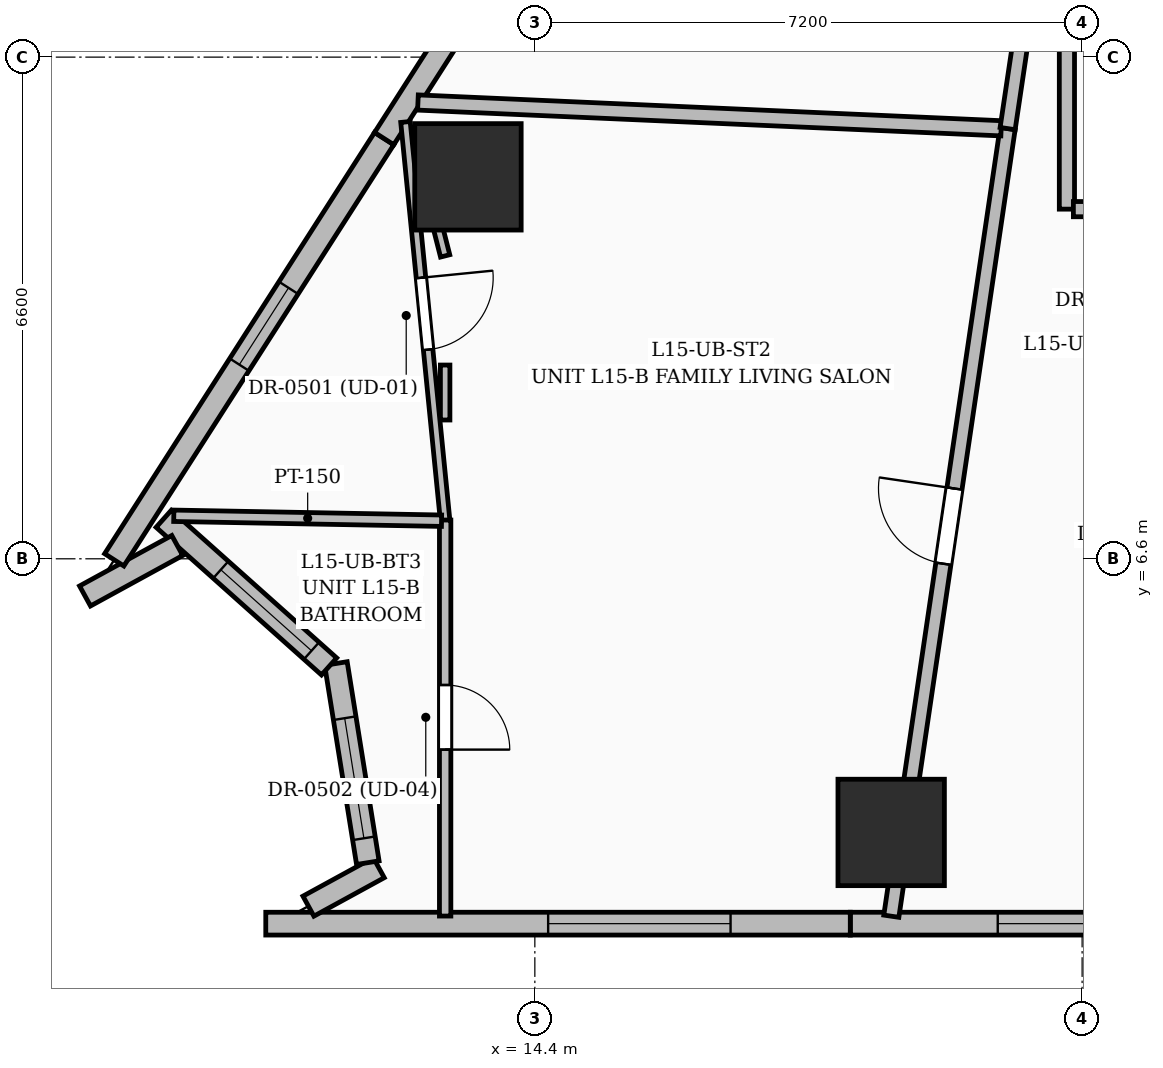
"""IFC4 building model, lengths in metres.
Left out: names, types, materials, properties, quantities, classifications, styles, units other than length and angle.
Written with IfcOpenShell. Run it as: python <this file> out.ifc"""

import sys

from ifc_helpers import new_model, si_unit, direction, frame, frame_2d, origin, origin_2d, place, context, subcontext, project, spatial, rectangle, extrude, element, fill, save


model = new_model("IFC4")
c1 = context("Model", 3, precision=1e-05, world=origin(), true_north=direction((0.0, 1.0)))
c2 = subcontext(c1, "Body", "Model", "MODEL_VIEW")
j1 = project(units=[si_unit("LENGTHUNIT", "METRE"), si_unit("PLANEANGLEUNIT", "RADIAN")], contexts=[c1])
p1 = place(None, origin())
s1 = spatial("IfcSite", under=j1, at=p1, CompositionType="ELEMENT")
p2 = place(p1, origin())
s2 = spatial("IfcBuilding", under=s1, at=p2, CompositionType="ELEMENT")
p3 = place(p2, frame((0.0, 0.0, 64.2)))
s3 = spatial("IfcBuildingStorey", under=s2, at=p3, CompositionType="ELEMENT", Elevation=64.2)
for number, where, z_axis, x_axis in (
    (1, (19.088, 3.0, 0.0), (0.0, 0.0, 1.0), (1.0, 0.0, 0.0)),
    (2, (13.52, 11.625, 0.0), (0.0, 0.0, 1.0), (1.0, 0.0, 0.0)),
):
    element("IfcColumn", number, at=place(p3, frame(where, z_axis=z_axis, x_axis=x_axis)), inside=s3, PredefinedType="COLUMN", context=c2, shape_type="SweptSolid", body=[
        extrude(rectangle(XDim=1.4, YDim=1.4, at=origin_2d()), origin(), (0.0, 0.0, 1.0), 3.6),
    ])
p4 = place(p3, frame((25.96, 1.8, 0.0), z_axis=(0.0, 0.0, 1.0), x_axis=(-1.0, 0.0, 0.0)))
e3 = element("IfcWall", 3, at=p4, inside=s3, PredefinedType="SOLIDWALL", context=c2, shape_type="SweptSolid", body=[
    extrude(rectangle(XDim=7.41, YDim=0.3, at=frame_2d((3.705, 0.0))), origin(), (0.0, 0.0, 1.0), 3.35),
])
p5 = place(p4, frame((4.27, 0.0, 0.8)))
e4 = element("IfcOpeningElement", 4, at=p5, cuts=e3, PredefinedType="OPENING", context=c2, shape_type="SweptSolid", body=[
    extrude(rectangle(XDim=1.2, YDim=1.8, at=frame_2d((0.6, 0.9))), frame((0.0, 0.16, 0.0), z_axis=(0.0, -1.0, 0.0), x_axis=(1.0, 0.0, 0.0)), (0.0, 0.0, 1.0), 0.32),
])
p6 = place(p3, frame((18.55, 1.8, 0.0), z_axis=(0.0, 0.0, 1.0), x_axis=(-1.0, 0.0, 0.0)))
e5 = element("IfcWall", 5, at=p6, inside=s3, PredefinedType="SOLIDWALL", context=c2, shape_type="SweptSolid", body=[
    extrude(rectangle(XDim=7.69, YDim=0.3, at=frame_2d((3.845, 0.0))), origin(), (0.0, 0.0, 1.0), 3.35),
])
p7 = place(p6, frame((1.575, 0.0, 0.6)))
e6 = element("IfcOpeningElement", 6, at=p7, cuts=e5, PredefinedType="OPENING", context=c2, shape_type="SweptSolid", body=[
    extrude(rectangle(XDim=2.4, YDim=2.1, at=frame_2d((1.2, 1.05))), frame((0.0, 0.16, 0.0), z_axis=(0.0, -1.0, 0.0), x_axis=(1.0, 0.0, 0.0)), (0.0, 0.0, 1.0), 0.32),
])
p8 = place(p3, frame((11.421, 2.03, 0.0), z_axis=(0.0, 0.0, 1.0), x_axis=(0.877488347229, 0.479597957124, 0.0)))
e7 = element("IfcWall", 7, at=p8, inside=s3, PredefinedType="SOLIDWALL", context=c2, shape_type="SweptSolid", body=[
    extrude(rectangle(XDim=1.055, YDim=0.3, at=frame_2d((0.527, 0.0))), origin(), (0.0, 0.0, 1.0), 3.35),
])
p9 = place(p3, frame((12.203, 2.602, 0.0), z_axis=(0.0, 0.0, 1.0), x_axis=(-0.158173523246, 0.987411330978, 0.0)))
e8 = element("IfcWall", 8, at=p9, inside=s3, PredefinedType="SOLIDWALL", context=c2, shape_type="SweptSolid", body=[
    extrude(rectangle(XDim=2.653, YDim=0.3, at=frame_2d((1.327, 0.0))), origin(), (0.0, 0.0, 1.0), 3.35),
])
p10 = place(p9, frame((0.325, 0.0, 0.55)))
e9 = element("IfcOpeningElement", 9, at=p10, cuts=e8, PredefinedType="OPENING", context=c2, shape_type="SweptSolid", body=[
    extrude(rectangle(XDim=1.6, YDim=2.2, at=frame_2d((0.8, 1.1))), frame((0.0, 0.16, 0.0), z_axis=(0.0, -1.0, 0.0), x_axis=(1.0, 0.0, 0.0)), (0.0, 0.0, 1.0), 0.32),
])
p11 = place(p3, frame((11.693, 5.184, 0.0), z_axis=(0.0, 0.0, 1.0), x_axis=(-0.746022306539, 0.665920954878, 0.0)))
e10 = element("IfcWall", 10, at=p11, inside=s3, PredefinedType="SOLIDWALL", context=c2, shape_type="SweptSolid", body=[
    extrude(rectangle(XDim=2.917, YDim=0.3, at=frame_2d((1.458, 0.0))), origin(), (0.0, 0.0, 1.0), 3.35),
])
p12 = place(p11, frame((0.31, 0.0, 0.55)))
e11 = element("IfcOpeningElement", 11, at=p12, cuts=e10, PredefinedType="OPENING", context=c2, shape_type="SweptSolid", body=[
    extrude(rectangle(XDim=1.6, YDim=2.2, at=frame_2d((0.8, 1.1))), frame((0.0, 0.16, 0.0), z_axis=(0.0, -1.0, 0.0), x_axis=(1.0, 0.0, 0.0)), (0.0, 0.0, 1.0), 0.32),
])
p13 = place(p3, frame((9.696, 6.775, 0.0), z_axis=(0.0, 0.0, 1.0), x_axis=(-0.877260839779, -0.480013977912, 0.0)))
e12 = element("IfcWall", 12, at=p13, inside=s3, PredefinedType="SOLIDWALL", context=c2, shape_type="SweptSolid", body=[
    extrude(rectangle(XDim=1.384, YDim=0.3, at=frame_2d((0.692, 0.0))), origin(), (0.0, 0.0, 1.0), 3.35),
])
p14 = place(p3, frame((8.867, 6.586, 0.0), z_axis=(0.0, 0.0, 1.0), x_axis=(0.539484105382, 0.841995783862, 0.0)))
e13 = element("IfcWall", 13, at=p14, inside=s3, PredefinedType="SOLIDWALL", context=c2, shape_type="SweptSolid", body=[
    extrude(rectangle(XDim=6.582, YDim=0.3, at=frame_2d((3.291, 0.0))), origin(), (0.0, 0.0, 1.0), 3.35),
])
p15 = place(p14, frame((3.05, 0.0, 0.8)))
e14 = element("IfcOpeningElement", 14, at=p15, cuts=e13, PredefinedType="OPENING", context=c2, shape_type="SweptSolid", body=[
    extrude(rectangle(XDim=1.2, YDim=1.8, at=frame_2d((0.6, 0.9))), frame((0.0, 0.16, 0.0), z_axis=(0.0, -1.0, 0.0), x_axis=(1.0, 0.0, 0.0)), (0.0, 0.0, 1.0), 0.32),
])
p16 = place(p3, frame((12.418, 12.128, 0.0), z_axis=(0.0, 0.0, 1.0), x_axis=(0.5395054239, 0.841982124265, 0.0)))
e15 = element("IfcWall", 15, at=p16, inside=s3, PredefinedType="SOLIDWALL", context=c2, shape_type="SweptSolid", body=[
    extrude(rectangle(XDim=7.207, YDim=0.3, at=frame_2d((3.604, 0.0))), origin(), (0.0, 0.0, 1.0), 3.35),
])
p17 = place(p16, frame((2.45, 0.0, 0.6)))
e16 = element("IfcOpeningElement", 16, at=p17, cuts=e15, PredefinedType="OPENING", context=c2, shape_type="SweptSolid", body=[
    extrude(rectangle(XDim=2.4, YDim=2.1, at=frame_2d((1.2, 1.05))), frame((0.0, 0.16, 0.0), z_axis=(0.0, -1.0, 0.0), x_axis=(1.0, 0.0, 0.0)), (0.0, 0.0, 1.0), 0.32),
])
p18 = place(p3, frame((21.4, 17.49, 0.0), z_axis=(0.0, 0.0, 1.0), x_axis=(0.0, -1.0, 0.0)))
e17 = element("IfcWall", 17, at=p18, inside=s3, PredefinedType="PARTITIONING", context=c2, shape_type="SweptSolid", body=[
    extrude(rectangle(XDim=6.29, YDim=0.2, at=frame_2d((3.145, 0.0))), origin(), (0.0, 0.0, 1.0), 2.771),
])
p19 = place(p3, frame((21.485, 11.2, 0.0), z_axis=(0.0, 0.0, 1.0), x_axis=(1.0, 0.0, 0.0)))
e18 = element("IfcWall", 18, at=p19, inside=s3, PredefinedType="PARTITIONING", context=c2, shape_type="SweptSolid", body=[
    extrude(rectangle(XDim=3.384, YDim=0.2, at=frame_2d((1.692, 0.0))), origin(), (0.0, 0.0, 1.0), 2.771),
])
p20 = place(p19, frame((1.25, 0.0, 0.0)))
e19 = element("IfcOpeningElement", 19, at=p20, cuts=e18, PredefinedType="OPENING", context=c2, shape_type="SweptSolid", body=[
    extrude(rectangle(XDim=1.0, YDim=2.2, at=frame_2d((0.5, 1.1))), frame((0.0, 0.11, 0.0), z_axis=(0.0, -1.0, 0.0), x_axis=(1.0, 0.0, 0.0)), (0.0, 0.0, 1.0), 0.22),
])
p21 = place(p3, frame((12.698, 12.347, 0.0), z_axis=(0.0, 0.0, 1.0), x_axis=(0.098994836479, -0.995087947043, 0.0)))
e20 = element("IfcWall", 20, at=p21, inside=s3, PredefinedType="PARTITIONING", context=c2, shape_type="SweptSolid", body=[
    extrude(rectangle(XDim=5.273, YDim=0.125, at=frame_2d((2.636, 0.0))), origin(), (0.0, 0.0, 1.0), 3.35),
])
p22 = place(p21, frame((2.06, 0.0, 0.0)))
e21 = element("IfcOpeningElement", 21, at=p22, cuts=e20, PredefinedType="OPENING", context=c2, shape_type="SweptSolid", body=[
    extrude(rectangle(XDim=0.95, YDim=2.2, at=frame_2d((0.475, 1.1))), frame((0.0, 0.072, 0.0), z_axis=(0.0, -1.0, 0.0), x_axis=(1.0, 0.0, 0.0)), (0.0, 0.0, 1.0), 0.145),
])
p23 = place(p3, frame((13.22, 7.11, 0.0), z_axis=(0.0, 0.0, 1.0), x_axis=(0.0, -1.0, 0.0)))
e22 = element("IfcWall", 22, at=p23, inside=s3, PredefinedType="PARTITIONING", context=c2, shape_type="SweptSolid", body=[
    extrude(rectangle(XDim=5.21, YDim=0.15, at=frame_2d((2.605, 0.0))), origin(), (0.0, 0.0, 1.0), 3.35),
])
p24 = place(p23, frame((2.17, 0.0, 0.0)))
e23 = element("IfcOpeningElement", 23, at=p24, cuts=e22, PredefinedType="OPENING", context=c2, shape_type="SweptSolid", body=[
    extrude(rectangle(XDim=0.85, YDim=2.1, at=frame_2d((0.425, 1.05))), frame((0.0, 0.085, 0.0), z_axis=(0.0, -1.0, 0.0), x_axis=(1.0, 0.0, 0.0)), (0.0, 0.0, 1.0), 0.17),
])
p25 = place(p3, frame((19.09, 1.898, 0.0), z_axis=(0.0, 0.0, 1.0), x_axis=(0.146073061153, 0.989273804771, 0.0)))
e24 = element("IfcWall", 24, at=p25, inside=s3, PredefinedType="PARTITIONING", context=c2, shape_type="SweptSolid", body=[
    extrude(rectangle(XDim=10.474, YDim=0.2, at=frame_2d((5.237, 0.0))), origin(), (0.0, 0.0, 1.0), 2.279),
])
p26 = place(p25, frame((4.688, 0.0, 0.0)))
e25 = element("IfcOpeningElement", 25, at=p26, cuts=e24, PredefinedType="OPENING", context=c2, shape_type="SweptSolid", body=[
    extrude(rectangle(XDim=1.0, YDim=2.2, at=frame_2d((0.5, 1.1))), frame((0.0, 0.11, 0.0), z_axis=(0.0, -1.0, 0.0), x_axis=(1.0, 0.0, 0.0)), (0.0, 0.0, 1.0), 0.22),
])
p27 = place(p3, frame((20.535, 12.263, 0.0), z_axis=(0.0, 0.0, 1.0), x_axis=(-0.999022029659, 0.044215203896, 0.0)))
e26 = element("IfcWall", 26, at=p27, inside=s3, PredefinedType="PARTITIONING", context=c2, shape_type="SweptSolid", body=[
    extrude(rectangle(XDim=7.681, YDim=0.2, at=frame_2d((3.84, 0.0))), origin(), (0.0, 0.0, 1.0), 2.37),
])
p28 = place(p3, frame((9.65, 7.166, 0.0), z_axis=(0.0, 0.0, 1.0), x_axis=(0.999830116918, -0.018431964176, 0.0)))
e27 = element("IfcWall", 27, at=p28, inside=s3, PredefinedType="PARTITIONING", context=c2, shape_type="SweptSolid", body=[
    extrude(rectangle(XDim=3.523, YDim=0.15, at=frame_2d((1.762, 0.0))), origin(), (0.0, 0.0, 1.0), 3.35),
])
p29 = place(p3, frame((21.24, 16.417, 0.0), z_axis=(0.0, 0.0, 1.0), x_axis=(-0.147485410428, -0.989064231337, 0.0)))
e28 = element("IfcWall", 28, at=p29, inside=s3, PredefinedType="PARTITIONING", context=c2, shape_type="SweptSolid", body=[
    extrude(rectangle(XDim=4.203, YDim=0.2, at=frame_2d((2.102, 0.0))), origin(), (0.0, 0.0, 1.0), 2.771),
])
p30 = place(p3, frame((12.905, 11.825, 0.0), z_axis=(0.0, 0.0, 1.0), x_axis=(0.246170919205, -0.969226433058, 0.0)))
e29 = element("IfcWall", 29, at=p30, inside=s3, PredefinedType="PARTITIONING", context=c2, shape_type="SweptSolid", body=[
    extrude(rectangle(XDim=1.279, YDim=0.125, at=frame_2d((0.64, 0.0))), origin(), (0.0, 0.0, 1.0), 3.35),
])
p31 = place(p3, frame((13.22, 9.149, 0.0), z_axis=(0.0, 0.0, 1.0), x_axis=(0.0, -1.0, 0.0)))
e30 = element("IfcWall", 30, at=p31, inside=s3, PredefinedType="PARTITIONING", context=c2, shape_type="SweptSolid", body=[
    extrude(rectangle(XDim=0.723, YDim=0.125, at=frame_2d((0.361, 0.0))), origin(), (0.0, 0.0, 1.0), 3.35),
])
p32 = place(p5, origin())
e31 = element("IfcWindow", 31, at=p32, inside=s3, PartitioningType="SINGLE_PANEL", PredefinedType="WINDOW", context=c2, shape_type="SweptSolid", body=[
    extrude(rectangle(XDim=1.2, YDim=1.8, at=frame_2d((0.6, 0.9))), frame((0.0, 0.03, 0.0), z_axis=(0.0, -1.0, 0.0), x_axis=(1.0, 0.0, 0.0)), (0.0, 0.0, 1.0), 0.06),
])
fill(e4, e31)
p33 = place(p7, origin())
e32 = element("IfcWindow", 32, at=p33, inside=s3, PartitioningType="SINGLE_PANEL", PredefinedType="WINDOW", context=c2, shape_type="SweptSolid", body=[
    extrude(rectangle(XDim=2.4, YDim=2.1, at=frame_2d((1.2, 1.05))), frame((0.0, 0.03, 0.0), z_axis=(0.0, -1.0, 0.0), x_axis=(1.0, 0.0, 0.0)), (0.0, 0.0, 1.0), 0.06),
])
fill(e6, e32)
p34 = place(p10, origin())
e33 = element("IfcWindow", 33, at=p34, inside=s3, PartitioningType="SINGLE_PANEL", PredefinedType="WINDOW", context=c2, shape_type="SweptSolid", body=[
    extrude(rectangle(XDim=1.6, YDim=2.2, at=frame_2d((0.8, 1.1))), frame((0.0, 0.03, 0.0), z_axis=(0.0, -1.0, 0.0), x_axis=(1.0, 0.0, 0.0)), (0.0, 0.0, 1.0), 0.06),
])
fill(e9, e33)
p35 = place(p12, origin())
e34 = element("IfcWindow", 34, at=p35, inside=s3, PartitioningType="SINGLE_PANEL", PredefinedType="WINDOW", context=c2, shape_type="SweptSolid", body=[
    extrude(rectangle(XDim=1.6, YDim=2.2, at=frame_2d((0.8, 1.1))), frame((0.0, 0.03, 0.0), z_axis=(0.0, -1.0, 0.0), x_axis=(1.0, 0.0, 0.0)), (0.0, 0.0, 1.0), 0.06),
])
fill(e11, e34)
p36 = place(p15, origin())
e35 = element("IfcWindow", 35, at=p36, inside=s3, PartitioningType="SINGLE_PANEL", PredefinedType="WINDOW", context=c2, shape_type="SweptSolid", body=[
    extrude(rectangle(XDim=1.2, YDim=1.8, at=frame_2d((0.6, 0.9))), frame((0.0, 0.03, 0.0), z_axis=(0.0, -1.0, 0.0), x_axis=(1.0, 0.0, 0.0)), (0.0, 0.0, 1.0), 0.06),
])
fill(e14, e35)
p37 = place(p22, origin())
e36 = element("IfcDoor", 36, at=p37, inside=s3, OperationType="SINGLE_SWING_LEFT", PredefinedType="DOOR", context=c2, shape_type="SweptSolid", body=[
    extrude(rectangle(XDim=0.95, YDim=2.2, at=frame_2d((0.475, 1.1))), frame((0.0, 0.025, 0.0), z_axis=(0.0, -1.0, 0.0), x_axis=(1.0, 0.0, 0.0)), (0.0, 0.0, 1.0), 0.05),
])
fill(e21, e36)
p38 = place(p24, origin())
e37 = element("IfcDoor", 37, at=p38, inside=s3, OperationType="SINGLE_SWING_RIGHT", PredefinedType="DOOR", context=c2, shape_type="SweptSolid", body=[
    extrude(rectangle(XDim=0.85, YDim=2.1, at=frame_2d((0.425, 1.05))), frame((0.0, 0.025, 0.0), z_axis=(0.0, -1.0, 0.0), x_axis=(1.0, 0.0, 0.0)), (0.0, 0.0, 1.0), 0.05),
])
fill(e23, e37)
p39 = place(p26, origin())
e38 = element("IfcDoor", 38, at=p39, inside=s3, OperationType="SINGLE_SWING_RIGHT", PredefinedType="DOOR", context=c2, shape_type="SweptSolid", body=[
    extrude(rectangle(XDim=1.0, YDim=2.2, at=frame_2d((0.5, 1.1))), frame((0.0, 0.025, 0.0), z_axis=(0.0, -1.0, 0.0), x_axis=(1.0, 0.0, 0.0)), (0.0, 0.0, 1.0), 0.05),
])
fill(e25, e38)
save(model, sys.argv[1])
